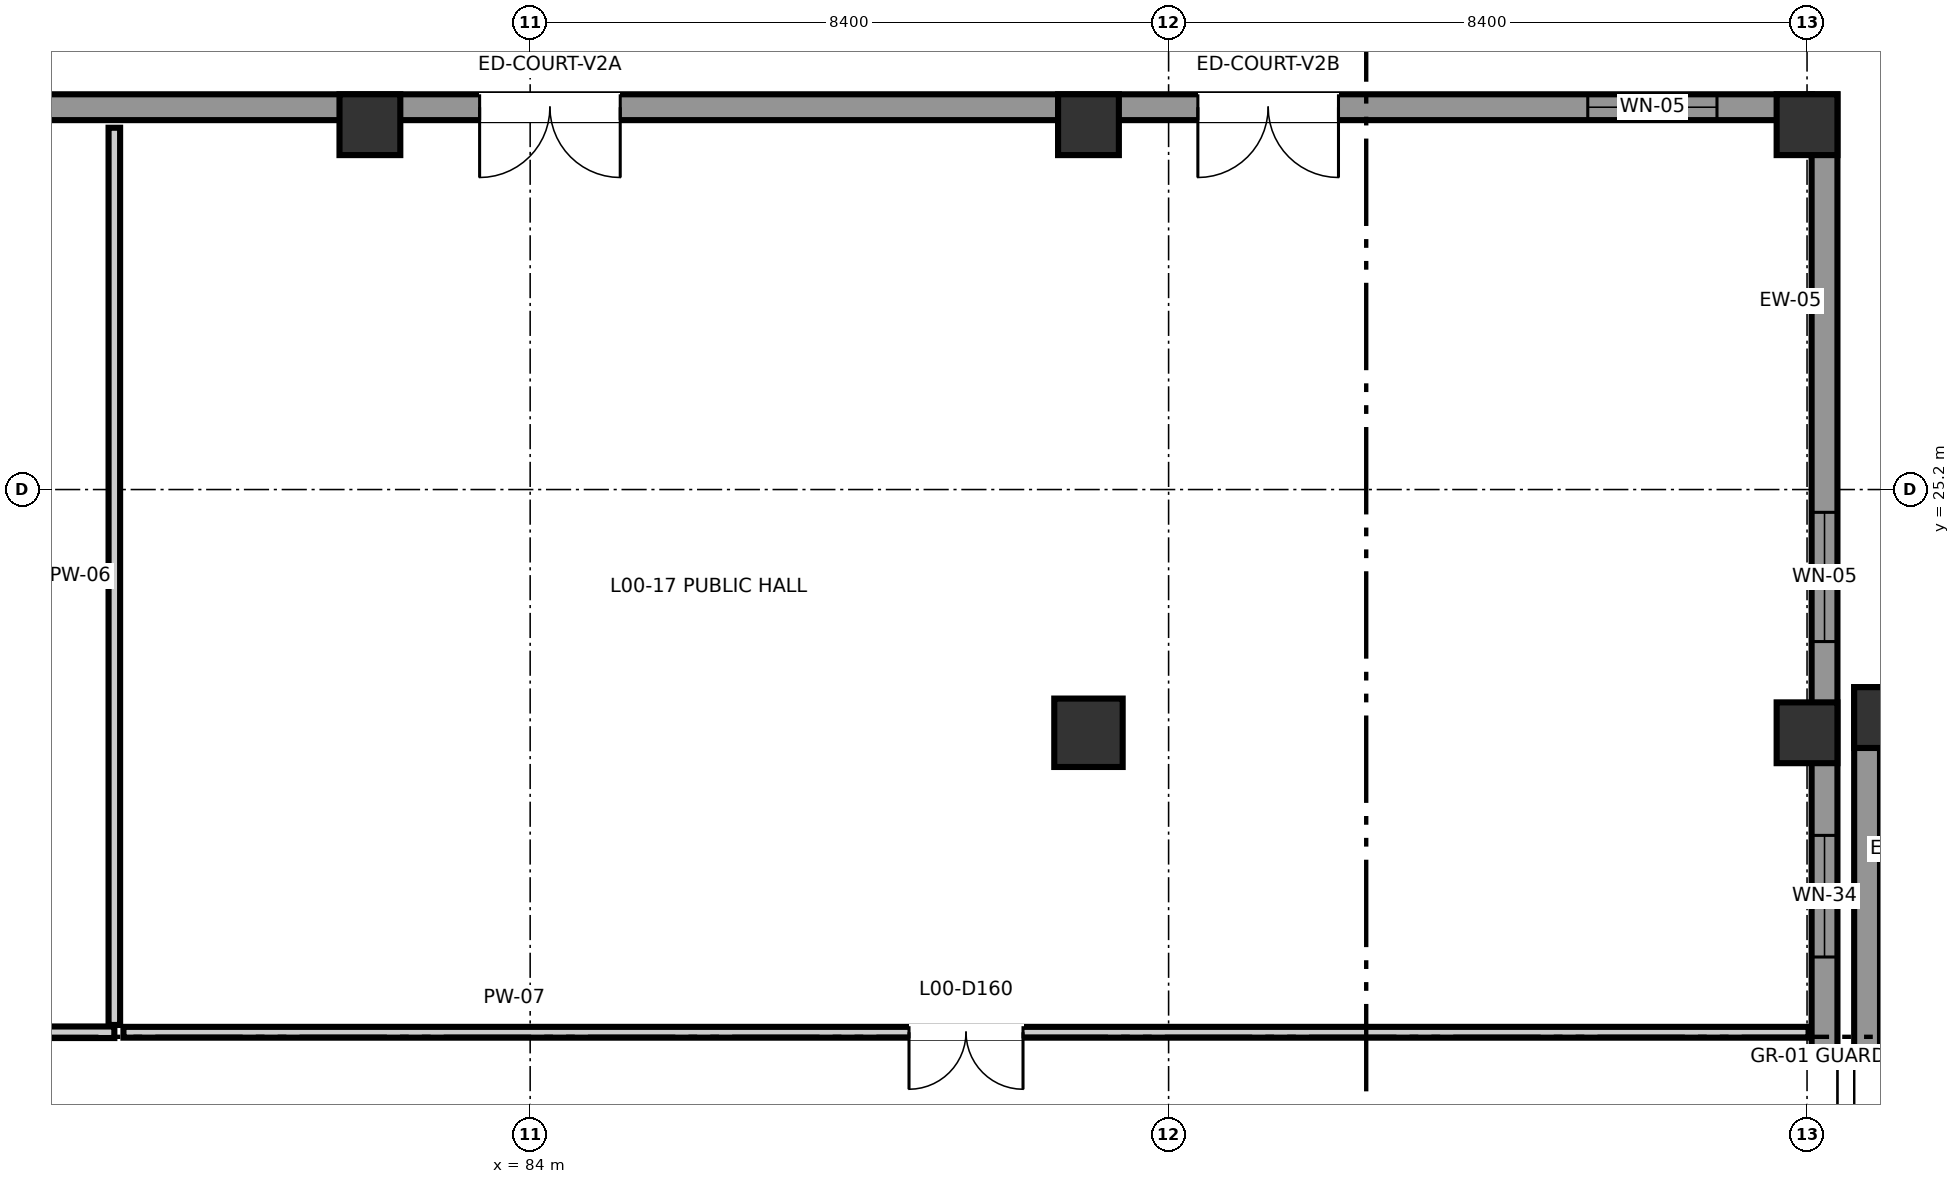
"""IFC4 building model, lengths in metres.
Left out: names, types, materials, properties, quantities, classifications, styles, units other than length and angle.
Written with IfcOpenShell. Run it as: python <this file> out.ifc"""

import sys

from ifc_helpers import new_model, si_unit, direction, frame, frame_2d, origin, origin_2d, place, context, subcontext, project, spatial, rectangle, extrude, element, fill, save


model = new_model("IFC4")
c1 = context("Model", 3, precision=1e-05, world=origin(), true_north=direction((0.0, 1.0)))
c2 = subcontext(c1, "Body", "Model", "MODEL_VIEW")
j1 = project(units=[si_unit("LENGTHUNIT", "METRE"), si_unit("PLANEANGLEUNIT", "RADIAN")], contexts=[c1])
p1 = place(None, origin())
s1 = spatial("IfcSite", under=j1, at=p1, CompositionType="ELEMENT")
p2 = place(p1, origin())
s2 = spatial("IfcBuilding", under=s1, at=p2, CompositionType="ELEMENT")
p3 = place(p2, origin())
s3 = spatial("IfcBuildingStorey", under=s2, at=p3, CompositionType="ELEMENT", Elevation=0.0)
p4 = place(p3, frame((81.891, 30.0, 0.0), z_axis=(0.0, 0.0, 1.0), x_axis=(1.0, 0.0, 0.0)))
e1 = element("IfcColumn", 1, at=p4, inside=s3, PredefinedType="COLUMN", context=c2, shape_type="SweptSolid", body=[
    extrude(rectangle(XDim=0.8, YDim=0.8, at=origin_2d()), origin(), (0.0, 0.0, 1.0), 5.4),
])
p5 = place(p3, frame((91.346, 22.0, 0.0), z_axis=(0.0, 0.0, 1.0), x_axis=(1.0, 0.0, 0.0)))
e2 = element("IfcColumn", 2, at=p5, inside=s3, PredefinedType="COLUMN", context=c2, shape_type="SweptSolid", body=[
    extrude(rectangle(XDim=0.9, YDim=0.9, at=origin_2d()), origin(), (0.0, 0.0, 1.0), 5.4),
])
for number, where, z_axis, x_axis in (
    (3, (91.346, 30.0, 0.0), (0.0, 0.0, 1.0), (1.0, 0.0, 0.0)),
    (4, (100.8, 22.0, 0.0), (0.0, 0.0, 1.0), (1.0, 0.0, 0.0)),
    (5, (100.8, 30.0, 0.0), (0.0, 0.0, 1.0), (1.0, 0.0, 0.0)),
    (6, (101.82, 22.2, 0.0), (0.0, 0.0, 1.0), (1.0, 0.0, 0.0)),
):
    element("IfcColumn", number, at=place(p3, frame(where, z_axis=z_axis, x_axis=x_axis)), inside=s3, PredefinedType="COLUMN", context=c2, shape_type="SweptSolid", body=[
        extrude(rectangle(XDim=0.8, YDim=0.8, at=origin_2d()), origin(), (0.0, 0.0, 1.0), 5.4),
    ])
p6 = place(p3, frame((101.03, 17.75, 0.0), z_axis=(0.0, 0.0, 1.0), x_axis=(0.0, 1.0, 0.0)))
e7 = element("IfcWall", 7, at=p6, inside=s3, PredefinedType="SOLIDWALL", context=c2, shape_type="SweptSolid", body=[
    extrude(rectangle(XDim=12.65, YDim=0.34, at=frame_2d((6.325, 0.0))), origin(), (0.0, 0.0, 1.0), 5.1),
])
p7 = place(p6, frame((1.3, 0.0, 0.72)))
e8 = element("IfcOpeningElement", 8, at=p7, cuts=e7, PredefinedType="OPENING", context=c2, shape_type="SweptSolid", body=[
    extrude(rectangle(XDim=1.6, YDim=2.35, at=frame_2d((0.8, 1.175))), frame((0.0, 0.185, 0.0), z_axis=(0.0, -1.0, 0.0), x_axis=(1.0, 0.0, 0.0)), (0.0, 0.0, 1.0), 0.37),
])
p8 = place(p6, frame((5.45, 0.0, 0.72)))
e9 = element("IfcOpeningElement", 9, at=p8, cuts=e7, PredefinedType="OPENING", context=c2, shape_type="SweptSolid", body=[
    extrude(rectangle(XDim=1.7, YDim=1.5, at=frame_2d((0.85, 0.75))), frame((0.0, 0.185, 0.0), z_axis=(0.0, -1.0, 0.0), x_axis=(1.0, 0.0, 0.0)), (0.0, 0.0, 1.0), 0.37),
])
p9 = place(p3, frame((100.865, 30.23, 0.0), z_axis=(0.0, 0.0, 1.0), x_axis=(-1.0, 0.0, 0.0)))
e10 = element("IfcWall", 10, at=p9, inside=s3, PredefinedType="SOLIDWALL", context=c2, shape_type="SweptSolid", body=[
    extrude(rectangle(XDim=66.31, YDim=0.34, at=frame_2d((33.155, 0.0))), origin(), (0.0, 0.0, 1.0), 5.1),
])
p10 = place(p9, frame((15.68, 0.0, 0.0)))
e11 = element("IfcOpeningElement", 11, at=p10, cuts=e10, PredefinedType="OPENING", context=c2, shape_type="SweptSolid", body=[
    extrude(rectangle(XDim=1.85, YDim=2.45, at=frame_2d((0.925, 1.225))), frame((0.0, 0.185, 0.0), z_axis=(0.0, -1.0, 0.0), x_axis=(1.0, 0.0, 0.0)), (0.0, 0.0, 1.0), 0.37),
])
p11 = place(p9, frame((6.23, 0.0, 0.0)))
e12 = element("IfcOpeningElement", 12, at=p11, cuts=e10, PredefinedType="OPENING", context=c2, shape_type="SweptSolid", body=[
    extrude(rectangle(XDim=1.85, YDim=2.45, at=frame_2d((0.925, 1.225))), frame((0.0, 0.185, 0.0), z_axis=(0.0, -1.0, 0.0), x_axis=(1.0, 0.0, 0.0)), (0.0, 0.0, 1.0), 0.37),
])
p12 = place(p9, frame((1.25, 0.0, 0.72)))
e13 = element("IfcOpeningElement", 13, at=p12, cuts=e10, PredefinedType="OPENING", context=c2, shape_type="SweptSolid", body=[
    extrude(rectangle(XDim=1.7, YDim=1.5, at=frame_2d((0.85, 0.75))), frame((0.0, 0.185, 0.0), z_axis=(0.0, -1.0, 0.0), x_axis=(1.0, 0.0, 0.0)), (0.0, 0.0, 1.0), 0.37),
])
p13 = place(p9, frame((30.525, 0.0, 0.72)))
e14 = element("IfcOpeningElement", 14, at=p13, cuts=e10, PredefinedType="OPENING", context=c2, shape_type="SweptSolid", body=[
    extrude(rectangle(XDim=1.95, YDim=1.95, at=frame_2d((0.975, 0.975))), frame((0.0, 0.185, 0.0), z_axis=(0.0, -1.0, 0.0), x_axis=(1.0, 0.0, 0.0)), (0.0, 0.0, 1.0), 0.37),
])
p14 = place(p9, frame((38.875, 0.0, 0.72)))
e15 = element("IfcOpeningElement", 15, at=p14, cuts=e10, PredefinedType="OPENING", context=c2, shape_type="SweptSolid", body=[
    extrude(rectangle(XDim=2.05, YDim=1.75, at=frame_2d((1.025, 0.875))), frame((0.0, 0.185, 0.0), z_axis=(0.0, -1.0, 0.0), x_axis=(1.0, 0.0, 0.0)), (0.0, 0.0, 1.0), 0.37),
])
p15 = place(p9, frame((59.775, 0.0, 0.72)))
e16 = element("IfcOpeningElement", 16, at=p15, cuts=e10, PredefinedType="OPENING", context=c2, shape_type="SweptSolid", body=[
    extrude(rectangle(XDim=2.25, YDim=2.15, at=frame_2d((1.125, 1.075))), frame((0.0, 0.185, 0.0), z_axis=(0.0, -1.0, 0.0), x_axis=(1.0, 0.0, 0.0)), (0.0, 0.0, 1.0), 0.37),
])
p16 = place(p3, frame((165.665, 22.43, 0.0), z_axis=(0.0, 0.0, 1.0), x_axis=(-1.0, 0.0, 0.0)))
e17 = element("IfcWall", 17, at=p16, inside=s3, PredefinedType="SOLIDWALL", context=c2, shape_type="SweptSolid", body=[
    extrude(rectangle(XDim=63.91, YDim=0.34, at=frame_2d((31.955, 0.0))), origin(), (0.0, 0.0, 1.0), 5.1),
])
p17 = place(p16, frame((1.4, 0.0, 0.72)))
e18 = element("IfcOpeningElement", 18, at=p17, cuts=e17, PredefinedType="OPENING", context=c2, shape_type="SweptSolid", body=[
    extrude(rectangle(XDim=1.4, YDim=1.5, at=frame_2d((0.7, 0.75))), frame((0.0, 0.185, 0.0), z_axis=(0.0, -1.0, 0.0), x_axis=(1.0, 0.0, 0.0)), (0.0, 0.0, 1.0), 0.37),
])
p18 = place(p16, frame((26.5, 0.0, 0.72)))
e19 = element("IfcOpeningElement", 19, at=p18, cuts=e17, PredefinedType="OPENING", context=c2, shape_type="SweptSolid", body=[
    extrude(rectangle(XDim=1.6, YDim=1.75, at=frame_2d((0.8, 0.875))), frame((0.0, 0.185, 0.0), z_axis=(0.0, -1.0, 0.0), x_axis=(1.0, 0.0, 0.0)), (0.0, 0.0, 1.0), 0.37),
])
p19 = place(p16, frame((43.225, 0.0, 0.72)))
e20 = element("IfcOpeningElement", 20, at=p19, cuts=e17, PredefinedType="OPENING", context=c2, shape_type="SweptSolid", body=[
    extrude(rectangle(XDim=1.75, YDim=1.75, at=frame_2d((0.875, 0.875))), frame((0.0, 0.185, 0.0), z_axis=(0.0, -1.0, 0.0), x_axis=(1.0, 0.0, 0.0)), (0.0, 0.0, 1.0), 0.37),
])
p20 = place(p16, frame((51.575, 0.0, 0.72)))
e21 = element("IfcOpeningElement", 21, at=p20, cuts=e17, PredefinedType="OPENING", context=c2, shape_type="SweptSolid", body=[
    extrude(rectangle(XDim=1.85, YDim=1.5, at=frame_2d((0.925, 0.75))), frame((0.0, 0.185, 0.0), z_axis=(0.0, -1.0, 0.0), x_axis=(1.0, 0.0, 0.0)), (0.0, 0.0, 1.0), 0.37),
])
p21 = place(p3, frame((101.59, 22.6, 0.0), z_axis=(0.0, 0.0, 1.0), x_axis=(0.0, -1.0, 0.0)))
e22 = element("IfcWall", 22, at=p21, inside=s3, PredefinedType="SOLIDWALL", context=c2, shape_type="SweptSolid", body=[
    extrude(rectangle(XDim=4.85, YDim=0.34, at=frame_2d((2.425, 0.0))), origin(), (0.0, 0.0, 1.0), 5.1),
])
p22 = place(p3, frame((57.028, 18.06, 0.0), z_axis=(0.0, 0.0, 1.0), x_axis=(1.0, 0.0, 0.0)))
e23 = element("IfcWall", 23, at=p22, inside=s3, PredefinedType="PARTITIONING", context=c2, shape_type="SweptSolid", body=[
    extrude(rectangle(XDim=21.501, YDim=0.152, at=frame_2d((10.75, 0.0))), origin(), (0.0, 0.0, 1.0), 5.1),
])
p23 = place(p22, frame((10.281, 0.0, 0.0)))
e24 = element("IfcOpeningElement", 24, at=p23, cuts=e23, PredefinedType="OPENING", context=c2, shape_type="SweptSolid", body=[
    extrude(rectangle(XDim=0.94, YDim=2.07, at=frame_2d((0.47, 1.035))), frame((0.0, 0.091, 0.0), z_axis=(0.0, -1.0, 0.0), x_axis=(1.0, 0.0, 0.0)), (0.0, 0.0, 1.0), 0.182),
])
p24 = place(p3, frame((78.529, 18.156, 0.0), z_axis=(0.0, 0.0, 1.0), x_axis=(0.0, 1.0, 0.0)))
e25 = element("IfcWall", 25, at=p24, inside=s3, PredefinedType="PARTITIONING", context=c2, shape_type="SweptSolid", body=[
    extrude(rectangle(XDim=11.804, YDim=0.152, at=frame_2d((5.902, 0.0))), origin(), (0.0, 0.0, 1.0), 5.1),
])
p25 = place(p3, frame((78.649, 18.06, 0.0), z_axis=(0.0, 0.0, 1.0), x_axis=(1.0, 0.0, 0.0)))
e26 = element("IfcWall", 26, at=p25, inside=s3, PredefinedType="PARTITIONING", context=c2, shape_type="SweptSolid", body=[
    extrude(rectangle(XDim=22.171, YDim=0.142, at=frame_2d((11.085, 0.0))), origin(), (0.0, 0.0, 1.0), 5.1),
])
p26 = place(p25, frame((10.335, 0.0, 0.0)))
e27 = element("IfcOpeningElement", 27, at=p26, cuts=e26, PredefinedType="OPENING", context=c2, shape_type="SweptSolid", body=[
    extrude(rectangle(XDim=1.5, YDim=2.25, at=frame_2d((0.75, 1.125))), frame((0.0, 0.086, 0.0), z_axis=(0.0, -1.0, 0.0), x_axis=(1.0, 0.0, 0.0)), (0.0, 0.0, 1.0), 0.172),
])
p27 = place(p7, origin())
e28 = element("IfcWindow", 28, at=p27, inside=s3, PartitioningType="SINGLE_PANEL", PredefinedType="WINDOW", context=c2, shape_type="SweptSolid", body=[
    extrude(rectangle(XDim=1.6, YDim=2.35, at=frame_2d((0.8, 1.175))), frame((0.0, 0.03, 0.0), z_axis=(0.0, -1.0, 0.0), x_axis=(1.0, 0.0, 0.0)), (0.0, 0.0, 1.0), 0.06),
])
fill(e8, e28)
p28 = place(p8, origin())
e29 = element("IfcWindow", 29, at=p28, inside=s3, PartitioningType="SINGLE_PANEL", PredefinedType="WINDOW", context=c2, shape_type="SweptSolid", body=[
    extrude(rectangle(XDim=1.7, YDim=1.5, at=frame_2d((0.85, 0.75))), frame((0.0, 0.03, 0.0), z_axis=(0.0, -1.0, 0.0), x_axis=(1.0, 0.0, 0.0)), (0.0, 0.0, 1.0), 0.06),
])
fill(e9, e29)
p29 = place(p10, frame((1.85, 0.0, 0.0), z_axis=(0.0, 0.0, 1.0), x_axis=(-1.0, 0.0, 0.0)))
e30 = element("IfcDoor", 30, at=p29, inside=s3, OperationType="DOUBLE_DOOR_SINGLE_SWING", PredefinedType="DOOR", context=c2, shape_type="SweptSolid", body=[
    extrude(rectangle(XDim=1.85, YDim=2.45, at=frame_2d((0.925, 1.225))), frame((0.0, 0.025, 0.0), z_axis=(0.0, -1.0, 0.0), x_axis=(1.0, 0.0, 0.0)), (0.0, 0.0, 1.0), 0.05),
])
fill(e11, e30)
p30 = place(p11, frame((1.85, 0.0, 0.0), z_axis=(0.0, 0.0, 1.0), x_axis=(-1.0, 0.0, 0.0)))
e31 = element("IfcDoor", 31, at=p30, inside=s3, OperationType="DOUBLE_DOOR_SINGLE_SWING", PredefinedType="DOOR", context=c2, shape_type="SweptSolid", body=[
    extrude(rectangle(XDim=1.85, YDim=2.45, at=frame_2d((0.925, 1.225))), frame((0.0, 0.025, 0.0), z_axis=(0.0, -1.0, 0.0), x_axis=(1.0, 0.0, 0.0)), (0.0, 0.0, 1.0), 0.05),
])
fill(e12, e31)
p31 = place(p12, origin())
e32 = element("IfcWindow", 32, at=p31, inside=s3, PartitioningType="SINGLE_PANEL", PredefinedType="WINDOW", context=c2, shape_type="SweptSolid", body=[
    extrude(rectangle(XDim=1.7, YDim=1.5, at=frame_2d((0.85, 0.75))), frame((0.0, 0.03, 0.0), z_axis=(0.0, -1.0, 0.0), x_axis=(1.0, 0.0, 0.0)), (0.0, 0.0, 1.0), 0.06),
])
fill(e13, e32)
p32 = place(p26, origin())
e33 = element("IfcDoor", 33, at=p32, inside=s3, OperationType="DOUBLE_DOOR_SINGLE_SWING", PredefinedType="DOOR", context=c2, shape_type="SweptSolid", body=[
    extrude(rectangle(XDim=1.5, YDim=2.25, at=frame_2d((0.75, 1.125))), frame((0.0, 0.025, 0.0), z_axis=(0.0, -1.0, 0.0), x_axis=(1.0, 0.0, 0.0)), (0.0, 0.0, 1.0), 0.05),
])
fill(e27, e33)
save(model, sys.argv[1])
